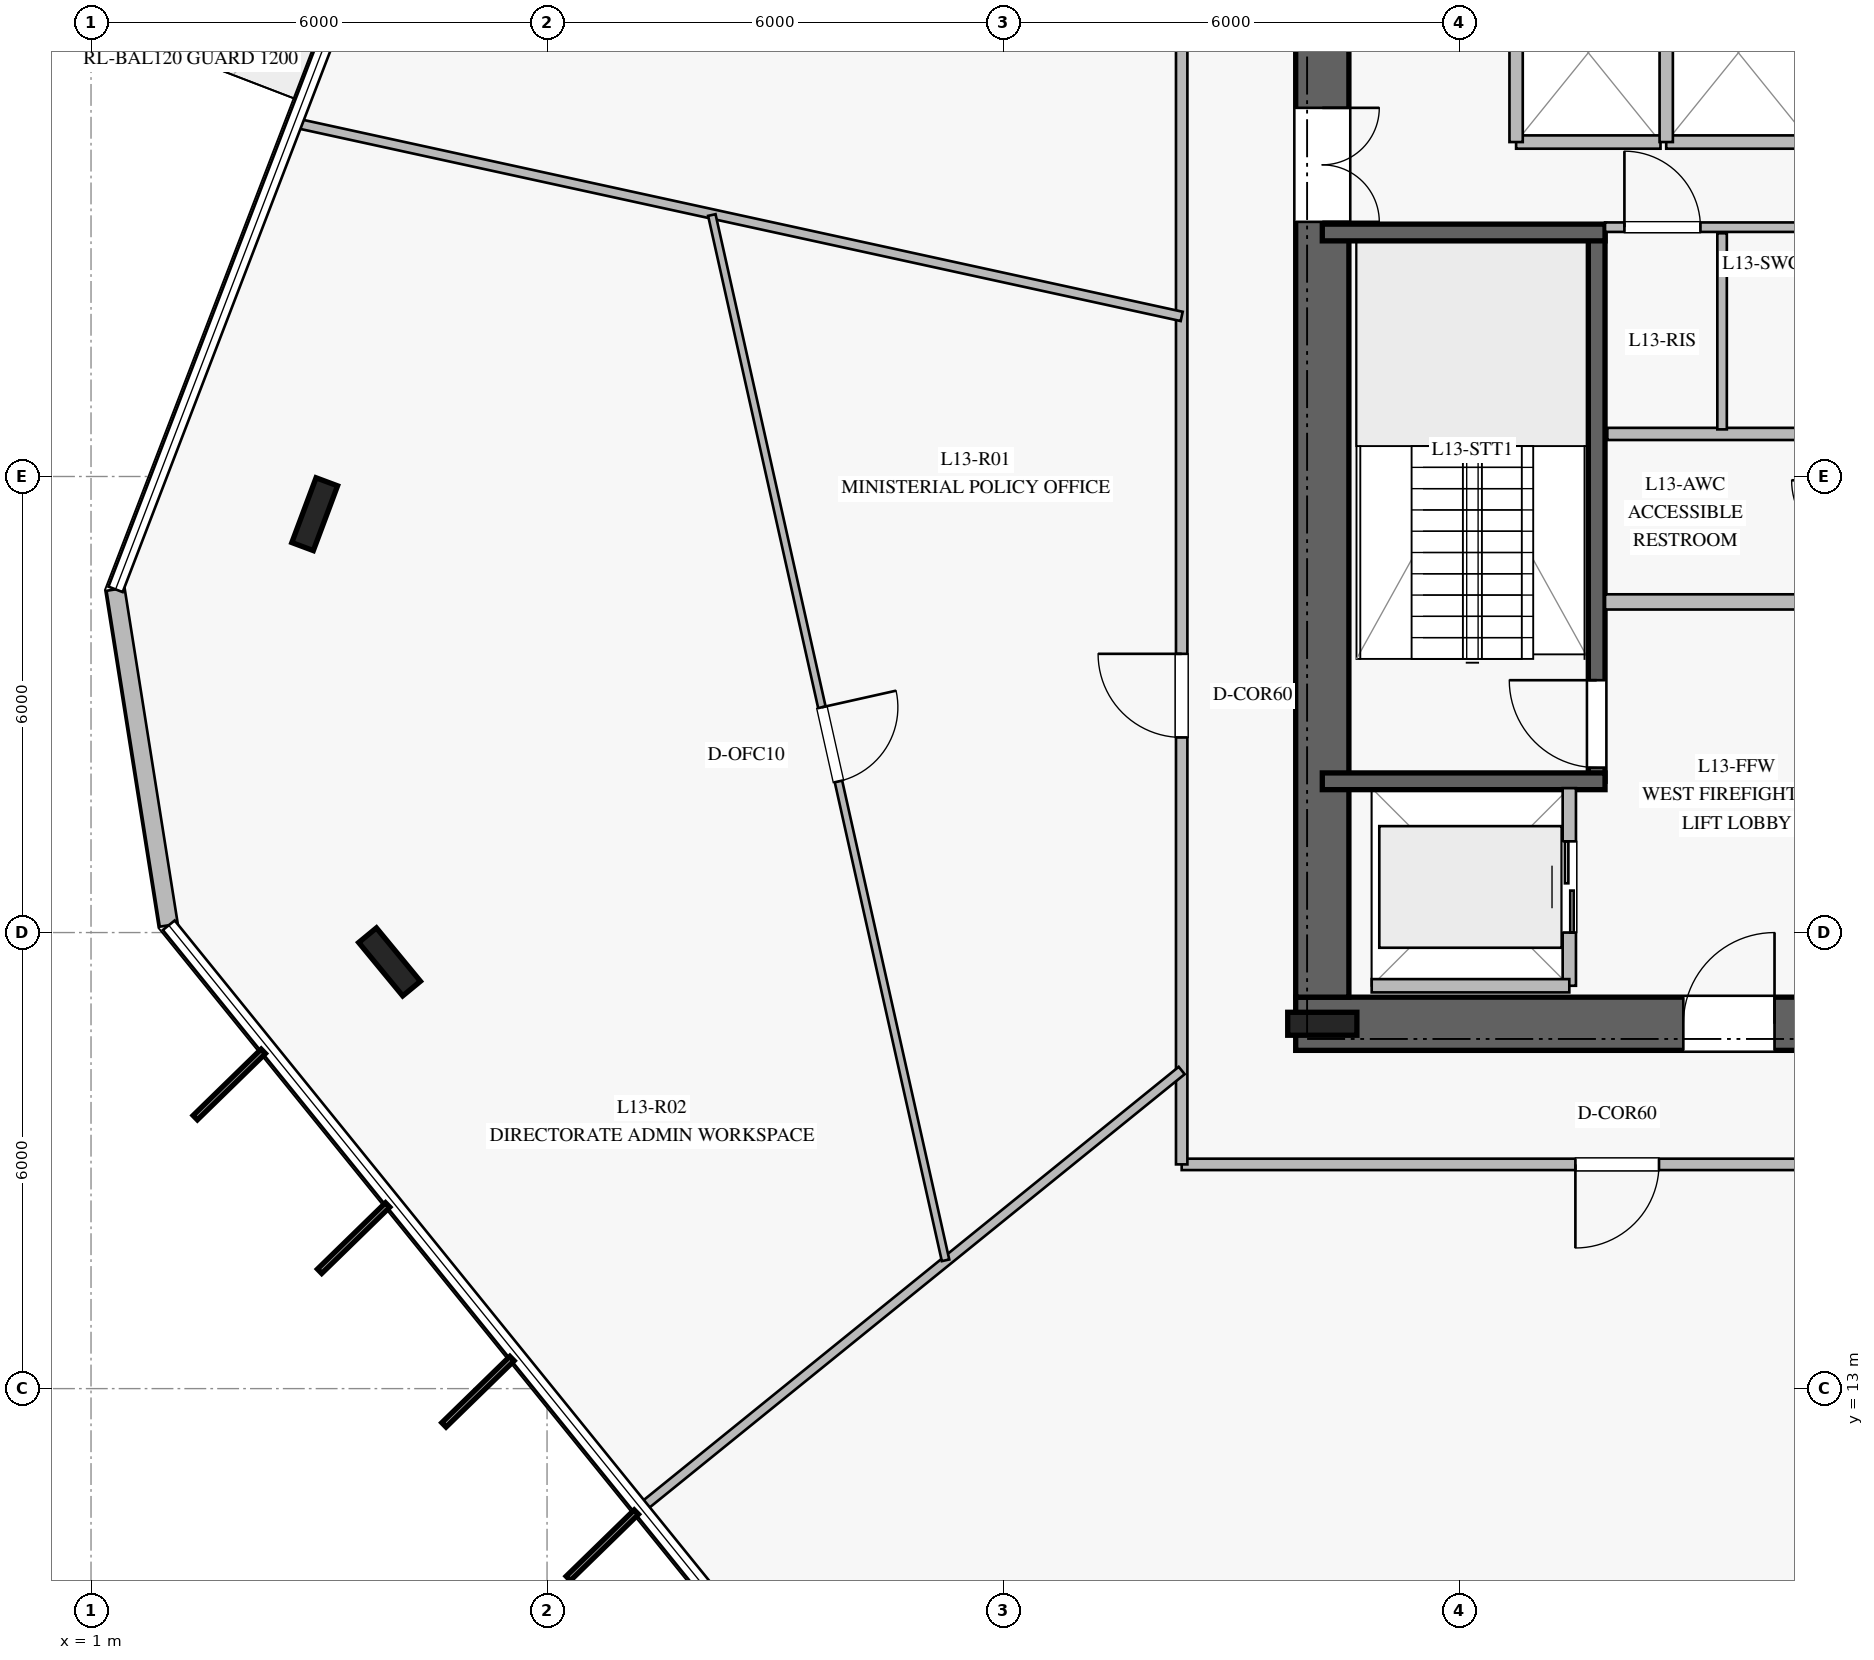
"""IFC4 building model, lengths in metres.
Left out: names, types, materials, properties, quantities, classifications, styles, units other than length and angle.
Written with IfcOpenShell. Run it as: python <this file> out.ifc"""

import sys

from ifc_helpers import new_model, si_unit, direction, frame, frame_2d, origin, origin_2d, place, context, subcontext, project, spatial, rectangle, i_section, extrude, element, fill, save


model = new_model("IFC4")
c1 = context("Model", 3, precision=1e-05, world=origin(), true_north=direction((0.0, 1.0)))
c2 = subcontext(c1, "Body", "Model", "MODEL_VIEW")
j1 = project(units=[si_unit("LENGTHUNIT", "METRE"), si_unit("PLANEANGLEUNIT", "RADIAN")], contexts=[c1])
p1 = place(None, origin())
s1 = spatial("IfcSite", under=j1, at=p1, CompositionType="ELEMENT")
p2 = place(p1, origin())
s2 = spatial("IfcBuilding", under=s1, at=p2, CompositionType="ELEMENT")
p3 = place(p2, frame((0.0, 0.0, 56.0)))
s3 = spatial("IfcBuildingStorey", under=s2, at=p3, CompositionType="ELEMENT", Elevation=56.0)
p4 = place(p3, frame((16.85, 17.8, 0.0), z_axis=(0.0, 0.0, 1.0), x_axis=(1.0, 0.0, 0.0)))
e1 = element("IfcWall", 1, at=p4, inside=s3, PredefinedType="SHEAR", context=c2, shape_type="SweptSolid", body=[
    extrude(rectangle(XDim=16.3, YDim=0.7, at=frame_2d((8.15, 0.0))), origin(), (0.0, 0.0, 1.0), 3.76),
])
p5 = place(p4, frame((5.1, 0.0, 0.0)))
e2 = element("IfcOpeningElement", 2, at=p5, cuts=e1, PredefinedType="OPENING", context=c2, shape_type="SweptSolid", body=[
    extrude(rectangle(XDim=1.2, YDim=2.25, at=frame_2d((0.6, 1.125))), frame((0.0, 0.36, 0.0), z_axis=(0.0, -1.0, 0.0), x_axis=(1.0, 0.0, 0.0)), (0.0, 0.0, 1.0), 0.72),
])
p6 = place(p4, frame((14.05, 0.0, 0.0)))
e3 = element("IfcOpeningElement", 3, at=p6, cuts=e1, PredefinedType="OPENING", context=c2, shape_type="SweptSolid", body=[
    extrude(rectangle(XDim=0.9, YDim=2.1, at=frame_2d((0.45, 1.05))), frame((0.0, 0.36, 0.0), z_axis=(0.0, -1.0, 0.0), x_axis=(1.0, 0.0, 0.0)), (0.0, 0.0, 1.0), 0.72),
])
p7 = place(p4, frame((7.95, 0.0, 0.0)))
e4 = element("IfcOpeningElement", 4, at=p7, cuts=e1, PredefinedType="OPENING", context=c2, shape_type="SweptSolid", body=[
    extrude(rectangle(XDim=1.1, YDim=2.2, at=frame_2d((0.55, 1.1))), frame((0.0, 0.36, 0.0), z_axis=(0.0, -1.0, 0.0), x_axis=(1.0, 0.0, 0.0)), (0.0, 0.0, 1.0), 0.72),
])
p8 = place(p4, frame((9.925, 0.0, 0.0)))
e5 = element("IfcOpeningElement", 5, at=p8, cuts=e1, PredefinedType="OPENING", context=c2, shape_type="SweptSolid", body=[
    extrude(rectangle(XDim=1.1, YDim=2.2, at=frame_2d((0.55, 1.1))), frame((0.0, 0.36, 0.0), z_axis=(0.0, -1.0, 0.0), x_axis=(1.0, 0.0, 0.0)), (0.0, 0.0, 1.0), 0.72),
])
p9 = place(p4, frame((11.9, 0.0, 0.0)))
e6 = element("IfcOpeningElement", 6, at=p9, cuts=e1, PredefinedType="OPENING", context=c2, shape_type="SweptSolid", body=[
    extrude(rectangle(XDim=1.1, YDim=2.2, at=frame_2d((0.55, 1.1))), frame((0.0, 0.36, 0.0), z_axis=(0.0, -1.0, 0.0), x_axis=(1.0, 0.0, 0.0)), (0.0, 0.0, 1.0), 0.72),
])
p10 = place(p3, frame((17.2, 31.85, 0.0), z_axis=(0.0, 0.0, 1.0), x_axis=(0.0, -1.0, 0.0)))
e7 = element("IfcWall", 7, at=p10, inside=s3, PredefinedType="SHEAR", context=c2, shape_type="SweptSolid", body=[
    extrude(rectangle(XDim=13.7, YDim=0.7, at=frame_2d((6.85, 0.0))), origin(), (0.0, 0.0, 1.0), 3.76),
])
p11 = place(p10, frame((2.0, 0.0, 0.0)))
e8 = element("IfcOpeningElement", 8, at=p11, cuts=e7, PredefinedType="OPENING", context=c2, shape_type="SweptSolid", body=[
    extrude(rectangle(XDim=1.5, YDim=2.2, at=frame_2d((0.75, 1.1))), frame((0.0, 0.36, 0.0), z_axis=(0.0, -1.0, 0.0), x_axis=(1.0, 0.0, 0.0)), (0.0, 0.0, 1.0), 0.72),
])
p12 = place(p3, frame((17.2, 17.8, 0.0), z_axis=(0.0, 0.0, 1.0), x_axis=(1.0, 0.0, 0.0)))
e9 = element("IfcColumn", 9, at=p12, inside=s3, PredefinedType="COLUMN", context=c2, shape_type="SweptSolid", body=[
    extrude(i_section(OverallWidth=0.302, OverallDepth=0.91, WebThickness=0.021, FlangeThickness=0.04, at=origin_2d()), origin(), (0.0, 0.0, 1.0), 4.0),
])
p13 = place(p3, frame((20.81, 20.99, 0.0), z_axis=(0.0, 0.0, 1.0), x_axis=(0.0, 1.0, 0.0)))
e10 = element("IfcWall", 10, at=p13, inside=s3, PredefinedType="SOLIDWALL", context=c2, shape_type="SweptSolid", body=[
    extrude(rectangle(XDim=7.22, YDim=0.22, at=frame_2d((3.61, 0.0))), origin(), (0.0, 0.0, 1.0), 3.76),
])
p14 = place(p13, frame((0.18, 0.0, 0.0)))
e11 = element("IfcOpeningElement", 11, at=p14, cuts=e10, PredefinedType="OPENING", context=c2, shape_type="SweptSolid", body=[
    extrude(rectangle(XDim=1.15, YDim=2.2, at=frame_2d((0.575, 1.1))), frame((0.0, 0.12, 0.0), z_axis=(0.0, -1.0, 0.0), x_axis=(1.0, 0.0, 0.0)), (0.0, 0.0, 1.0), 0.24),
])
for number, where, z_axis, x_axis in (
    (12, (17.2, 20.99, 0.0), (0.0, 0.0, 1.0), (1.0, 0.0, 0.0)),
    (13, (17.2, 28.21, 0.0), (0.0, 0.0, 1.0), (1.0, 0.0, 0.0)),
):
    element("IfcWall", number, at=place(p3, frame(where, z_axis=z_axis, x_axis=x_axis)), inside=s3, PredefinedType="SOLIDWALL", context=c2, shape_type="SweptSolid", body=[
        extrude(rectangle(XDim=3.72, YDim=0.22, at=frame_2d((1.86, 0.0))), origin(), (0.0, 0.0, 1.0), 3.76),
    ])
for number, where, z_axis, x_axis in (
    (14, (3.943, 24.504, 0.0), (0.0, 0.0, 1.0), (0.35, 0.937, 0.0)),
    (15, (4.928, 18.614, 0.0), (0.0, 0.0, 1.0), (-0.636, 0.772, 0.0)),
):
    element("IfcColumn", number, at=place(p3, frame(where, z_axis=z_axis, x_axis=x_axis)), inside=s3, PredefinedType="COLUMN", context=c2, shape_type="SweptSolid", body=[
        extrude(i_section(OverallWidth=0.302, OverallDepth=0.91, WebThickness=0.021, FlangeThickness=0.04, at=origin_2d()), origin(), (0.0, 0.0, 1.0), 4.0),
    ])
p15 = place(p3, frame((1.323, 23.515, 0.0), z_axis=(0.0, 0.0, 1.0), x_axis=(0.156447327705, -0.987686303263, 0.0)))
e16 = element("IfcWall", 16, at=p15, inside=s3, PredefinedType="STANDARD", context=c2, shape_type="SweptSolid", body=[
    extrude(rectangle(XDim=4.474, YDim=0.24, at=frame_2d((2.237, 0.0))), origin(), (0.0, 0.0, 1.0), 3.76),
])
p16 = place(p3, frame((20.92, 23.35, 0.0), z_axis=(0.0, 0.0, 1.0), x_axis=(1.0, 0.0, 0.0)))
e17 = element("IfcWall", 17, at=p16, inside=s3, PredefinedType="PARTITIONING", context=c2, shape_type="SweptSolid", body=[
    extrude(rectangle(XDim=3.38, YDim=0.2, at=frame_2d((1.69, 0.0))), origin(), (0.0, 0.0, 1.0), 3.76),
])
p17 = place(p3, frame((20.92, 28.28, 0.0), z_axis=(0.0, 0.0, 1.0), x_axis=(1.0, 0.0, 0.0)))
e18 = element("IfcWall", 18, at=p17, inside=s3, PredefinedType="PARTITIONING", context=c2, shape_type="SweptSolid", body=[
    extrude(rectangle(XDim=3.405, YDim=0.125, at=frame_2d((1.703, 0.0))), origin(), (0.0, 0.0, 1.0), 3.76),
])
p18 = place(p17, frame((0.255, 0.0, 0.0)))
e19 = element("IfcOpeningElement", 19, at=p18, cuts=e18, PredefinedType="OPENING", context=c2, shape_type="SweptSolid", body=[
    extrude(rectangle(XDim=1.0, YDim=2.15, at=frame_2d((0.5, 1.075))), frame((0.0, 0.073, 0.0), z_axis=(0.0, -1.0, 0.0), x_axis=(1.0, 0.0, 0.0)), (0.0, 0.0, 1.0), 0.145),
])
p19 = place(p3, frame((20.95, 25.56, 0.0), z_axis=(0.0, 0.0, 1.0), x_axis=(1.0, 0.0, 0.0)))
e20 = element("IfcWall", 20, at=p19, inside=s3, PredefinedType="PLUMBINGWALL", context=c2, shape_type="SweptSolid", body=[
    extrude(rectangle(XDim=3.3, YDim=0.16, at=frame_2d((1.65, 0.0))), origin(), (0.0, 0.0, 1.0), 3.76),
])
p20 = place(p3, frame((22.46, 25.62, 0.0), z_axis=(0.0, 0.0, 1.0), x_axis=(0.0, 1.0, 0.0)))
e21 = element("IfcWall", 21, at=p20, inside=s3, PredefinedType="PARTITIONING", context=c2, shape_type="SweptSolid", body=[
    extrude(rectangle(XDim=2.58, YDim=0.125, at=frame_2d((1.29, 0.0))), origin(), (0.0, 0.0, 1.0), 3.76),
])
p21 = place(p3, frame((19.75, 29.4, 0.0), z_axis=(0.0, 0.0, 1.0), x_axis=(1.0, 0.0, 0.0)))
e22 = element("IfcWall", 22, at=p21, inside=s3, PredefinedType="PARTITIONING", context=c2, shape_type="SweptSolid", body=[
    extrude(rectangle(XDim=1.9, YDim=0.175, at=frame_2d((0.95, 0.0))), origin(), (0.0, 0.0, 1.0), 3.76),
])
p22 = place(p3, frame((19.75, 29.4, 0.0), z_axis=(0.0, 0.0, 1.0), x_axis=(0.0, 1.0, 0.0)))
e23 = element("IfcWall", 23, at=p22, inside=s3, PredefinedType="PARTITIONING", context=c2, shape_type="SweptSolid", body=[
    extrude(rectangle(XDim=2.35, YDim=0.175, at=frame_2d((1.175, 0.0))), origin(), (0.0, 0.0, 1.0), 3.76),
])
p23 = place(p3, frame((21.725, 29.4, 0.0), z_axis=(0.0, 0.0, 1.0), x_axis=(1.0, 0.0, 0.0)))
e24 = element("IfcWall", 24, at=p23, inside=s3, PredefinedType="PARTITIONING", context=c2, shape_type="SweptSolid", body=[
    extrude(rectangle(XDim=1.9, YDim=0.175, at=frame_2d((0.95, 0.0))), origin(), (0.0, 0.0, 1.0), 3.76),
])
p24 = place(p3, frame((21.725, 29.4, 0.0), z_axis=(0.0, 0.0, 1.0), x_axis=(0.0, 1.0, 0.0)))
e25 = element("IfcWall", 25, at=p24, inside=s3, PredefinedType="PARTITIONING", context=c2, shape_type="SweptSolid", body=[
    extrude(rectangle(XDim=2.35, YDim=0.175, at=frame_2d((1.175, 0.0))), origin(), (0.0, 0.0, 1.0), 3.76),
])
p25 = place(p3, frame((20.45, 18.3, 0.0), z_axis=(0.0, 0.0, 1.0), x_axis=(0.0, 1.0, 0.0)))
e26 = element("IfcWall", 26, at=p25, inside=s3, PredefinedType="PARTITIONING", context=c2, shape_type="SweptSolid", body=[
    extrude(rectangle(XDim=2.6, YDim=0.175, at=frame_2d((1.3, 0.0))), origin(), (0.0, 0.0, 1.0), 3.76),
])
p26 = place(p25, frame((0.7, 0.0, 0.0)))
e27 = element("IfcOpeningElement", 27, at=p26, cuts=e26, PredefinedType="OPENING", context=c2, shape_type="SweptSolid", body=[
    extrude(rectangle(XDim=1.2, YDim=2.2, at=frame_2d((0.6, 1.1))), frame((0.0, 0.098, 0.0), z_axis=(0.0, -1.0, 0.0), x_axis=(1.0, 0.0, 0.0)), (0.0, 0.0, 1.0), 0.195),
])
p27 = place(p3, frame((17.85, 18.3, 0.0), z_axis=(0.0, 0.0, 1.0), x_axis=(1.0, 0.0, 0.0)))
e28 = element("IfcWall", 28, at=p27, inside=s3, PredefinedType="PARTITIONING", context=c2, shape_type="SweptSolid", body=[
    extrude(rectangle(XDim=2.6, YDim=0.175, at=frame_2d((1.3, 0.0))), origin(), (0.0, 0.0, 1.0), 3.76),
])
p28 = place(p3, frame((34.65, 15.95, 0.0), z_axis=(0.0, 0.0, 1.0), x_axis=(-1.0, 0.0, 0.0)))
e29 = element("IfcWall", 29, at=p28, inside=s3, PredefinedType="PARTITIONING", context=c2, shape_type="SweptSolid", body=[
    extrude(rectangle(XDim=19.3, YDim=0.15, at=frame_2d((9.65, 0.0))), origin(), (0.0, 0.0, 1.0), 3.21),
])
p29 = place(p28, frame((13.02, 0.0, 0.0)))
e30 = element("IfcOpeningElement", 30, at=p29, cuts=e29, PredefinedType="OPENING", context=c2, shape_type="SweptSolid", body=[
    extrude(rectangle(XDim=1.1, YDim=2.2, at=frame_2d((0.55, 1.1))), frame((0.0, 0.085, 0.0), z_axis=(0.0, -1.0, 0.0), x_axis=(1.0, 0.0, 0.0)), (0.0, 0.0, 1.0), 0.17),
])
p30 = place(p3, frame((15.35, 15.95, 0.0), z_axis=(0.0, 0.0, 1.0), x_axis=(0.0, 1.0, 0.0)))
e31 = element("IfcWall", 31, at=p30, inside=s3, PredefinedType="PARTITIONING", context=c2, shape_type="SweptSolid", body=[
    extrude(rectangle(XDim=18.1, YDim=0.15, at=frame_2d((9.05, 0.0))), origin(), (0.0, 0.0, 1.0), 3.21),
])
p31 = place(p30, frame((5.617, 0.0, 0.0)))
e32 = element("IfcOpeningElement", 32, at=p31, cuts=e31, PredefinedType="OPENING", context=c2, shape_type="SweptSolid", body=[
    extrude(rectangle(XDim=1.1, YDim=2.2, at=frame_2d((0.55, 1.1))), frame((0.0, 0.085, 0.0), z_axis=(0.0, -1.0, 0.0), x_axis=(1.0, 0.0, 0.0)), (0.0, 0.0, 1.0), 0.17),
])
p32 = place(p3, frame((15.35, 27.106, 0.0), z_axis=(0.0, 0.0, 1.0), x_axis=(-0.977011110965, 0.213188388642, 0.0)))
e33 = element("IfcWall", 33, at=p32, inside=s3, PredefinedType="PARTITIONING", context=c2, shape_type="SweptSolid", body=[
    extrude(rectangle(XDim=11.928, YDim=0.125, at=frame_2d((5.964, 0.0))), origin(), (0.0, 0.0, 1.0), 3.02),
])
p33 = place(p3, frame((15.35, 17.185, 0.0), z_axis=(0.0, 0.0, 1.0), x_axis=(-0.777163973681, -0.629298147155, 0.0)))
e34 = element("IfcWall", 34, at=p33, inside=s3, PredefinedType="PARTITIONING", context=c2, shape_type="SweptSolid", body=[
    extrude(rectangle(XDim=9.137, YDim=0.125, at=frame_2d((4.569, 0.0))), origin(), (0.0, 0.0, 1.0), 3.06),
])
p34 = place(p3, frame((9.168, 28.44, 0.0), z_axis=(0.0, 0.0, 1.0), x_axis=(0.21821254902, -0.975901267265, 0.0)))
e35 = element("IfcWall", 35, at=p34, inside=s3, PredefinedType="MOVABLE", context=c2, shape_type="SweptSolid", body=[
    extrude(rectangle(XDim=14.092, YDim=0.1, at=frame_2d((7.046, 0.0))), origin(), (0.0, 0.0, 1.0), 3.02),
])
p35 = place(p34, frame((6.636, 0.0, 0.0)))
e36 = element("IfcOpeningElement", 36, at=p35, cuts=e35, PredefinedType="OPENING", context=c2, shape_type="SweptSolid", body=[
    extrude(rectangle(XDim=1.0, YDim=2.15, at=frame_2d((0.5, 1.075))), frame((0.0, 0.06, 0.0), z_axis=(0.0, -1.0, 0.0), x_axis=(1.0, 0.0, 0.0)), (0.0, 0.0, 1.0), 0.12),
])
p36 = place(p14, origin())
e37 = element("IfcDoor", 37, at=p36, inside=s3, OperationType="SINGLE_SWING_RIGHT", PredefinedType="DOOR", context=c2, shape_type="SweptSolid", body=[
    extrude(rectangle(XDim=1.15, YDim=2.2, at=frame_2d((0.575, 1.1))), frame((0.0, 0.025, 0.0), z_axis=(0.0, -1.0, 0.0), x_axis=(1.0, 0.0, 0.0)), (0.0, 0.0, 1.0), 0.05),
])
fill(e11, e37)
p37 = place(p5, origin())
e38 = element("IfcDoor", 38, at=p37, inside=s3, OperationType="SINGLE_SWING_RIGHT", PredefinedType="DOOR", context=c2, shape_type="SweptSolid", body=[
    extrude(rectangle(XDim=1.2, YDim=2.25, at=frame_2d((0.6, 1.125))), frame((0.0, 0.025, 0.0), z_axis=(0.0, -1.0, 0.0), x_axis=(1.0, 0.0, 0.0)), (0.0, 0.0, 1.0), 0.05),
])
fill(e2, e38)
p38 = place(p11, origin())
e39 = element("IfcDoor", 39, at=p38, inside=s3, OperationType="DOUBLE_DOOR_SINGLE_SWING", PredefinedType="DOOR", context=c2, shape_type="SweptSolid", body=[
    extrude(rectangle(XDim=1.5, YDim=2.2, at=frame_2d((0.75, 1.1))), frame((0.0, 0.025, 0.0), z_axis=(0.0, -1.0, 0.0), x_axis=(1.0, 0.0, 0.0)), (0.0, 0.0, 1.0), 0.05),
])
fill(e8, e39)
p39 = place(p18, origin())
e40 = element("IfcDoor", 40, at=p39, inside=s3, OperationType="SINGLE_SWING_LEFT", PredefinedType="DOOR", context=c2, shape_type="SweptSolid", body=[
    extrude(rectangle(XDim=1.0, YDim=2.15, at=frame_2d((0.5, 1.075))), frame((0.0, 0.025, 0.0), z_axis=(0.0, -1.0, 0.0), x_axis=(1.0, 0.0, 0.0)), (0.0, 0.0, 1.0), 0.05),
])
fill(e19, e40)
p40 = place(p26, origin())
e41 = element("IfcDoor", 41, at=p40, inside=s3, OperationType="DOUBLE_DOOR_SLIDING", PredefinedType="DOOR", context=c2, shape_type="SweptSolid", body=[
    extrude(rectangle(XDim=1.2, YDim=2.2, at=frame_2d((0.6, 1.1))), frame((0.0, 0.025, 0.0), z_axis=(0.0, -1.0, 0.0), x_axis=(1.0, 0.0, 0.0)), (0.0, 0.0, 1.0), 0.05),
])
fill(e27, e41)
p41 = place(p31, origin())
e42 = element("IfcDoor", 42, at=p41, inside=s3, OperationType="SINGLE_SWING_RIGHT", PredefinedType="DOOR", context=c2, shape_type="SweptSolid", body=[
    extrude(rectangle(XDim=1.1, YDim=2.2, at=frame_2d((0.55, 1.1))), frame((0.0, 0.025, 0.0), z_axis=(0.0, -1.0, 0.0), x_axis=(1.0, 0.0, 0.0)), (0.0, 0.0, 1.0), 0.05),
])
fill(e32, e42)
p42 = place(p35, origin())
e43 = element("IfcDoor", 43, at=p42, inside=s3, OperationType="SINGLE_SWING_LEFT", PredefinedType="DOOR", context=c2, shape_type="SweptSolid", body=[
    extrude(rectangle(XDim=1.0, YDim=2.15, at=frame_2d((0.5, 1.075))), frame((0.0, 0.025, 0.0), z_axis=(0.0, -1.0, 0.0), x_axis=(1.0, 0.0, 0.0)), (0.0, 0.0, 1.0), 0.05),
])
fill(e36, e43)
p43 = place(p29, origin())
e44 = element("IfcDoor", 44, at=p43, inside=s3, OperationType="SINGLE_SWING_RIGHT", PredefinedType="DOOR", context=c2, shape_type="SweptSolid", body=[
    extrude(rectangle(XDim=1.1, YDim=2.2, at=frame_2d((0.55, 1.1))), frame((0.0, 0.025, 0.0), z_axis=(0.0, -1.0, 0.0), x_axis=(1.0, 0.0, 0.0)), (0.0, 0.0, 1.0), 0.05),
])
fill(e30, e44)
save(model, sys.argv[1])
